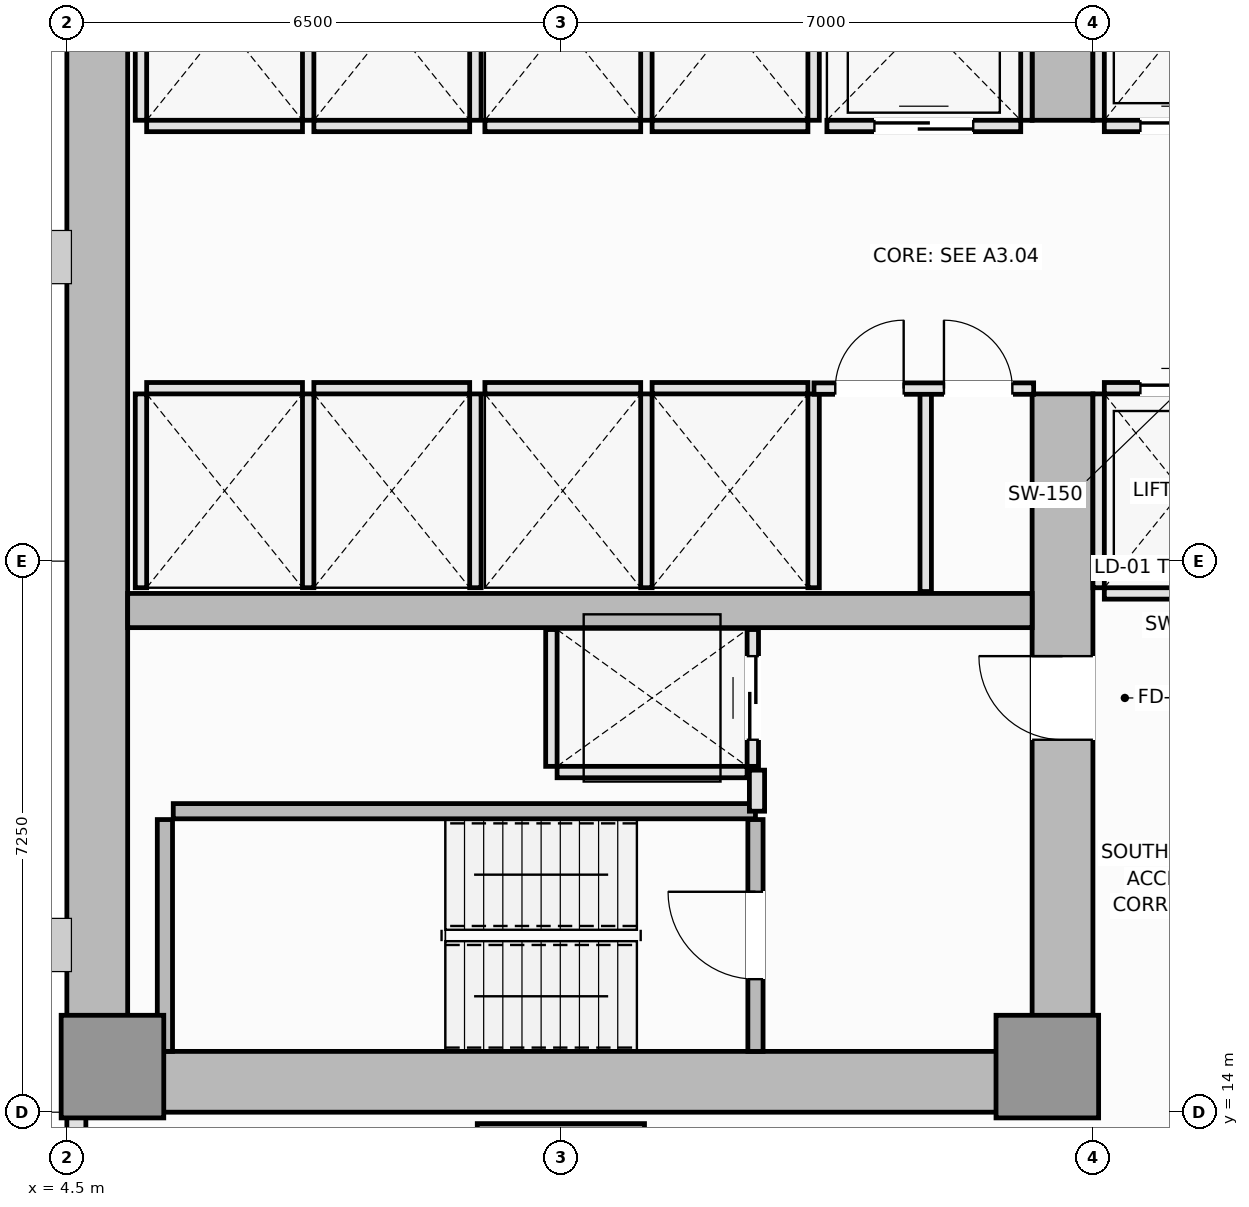
"""IFC4 building model, lengths in metres.
Left out: names, types, materials, properties, quantities, classifications, styles, units other than length and angle.
Written with IfcOpenShell. Run it as: python <this file> out.ifc"""

import sys

from ifc_helpers import new_model, si_unit, direction, frame, frame_2d, origin, origin_2d, place, context, subcontext, project, spatial, rectangle, extrude, element, fill, save


model = new_model("IFC4")
c1 = context("Model", 3, precision=1e-05, world=origin(), true_north=direction((0.0, 1.0)))
c2 = subcontext(c1, "Body", "Model", "MODEL_VIEW")
j1 = project(units=[si_unit("LENGTHUNIT", "METRE"), si_unit("PLANEANGLEUNIT", "RADIAN")], contexts=[c1])
p1 = place(None, origin())
s1 = spatial("IfcSite", under=j1, at=p1, CompositionType="ELEMENT")
p2 = place(p1, origin())
s2 = spatial("IfcBuilding", under=s1, at=p2, CompositionType="ELEMENT")
p3 = place(p2, frame((0.0, 0.0, 29.15)))
s3 = spatial("IfcBuildingStorey", under=s2, at=p3, CompositionType="ELEMENT", Elevation=29.15)
p4 = place(p3, frame((4.5, 14.4, 0.0), z_axis=(0.0, 0.0, 1.0), x_axis=(1.0, 0.0, 0.0)))
e1 = element("IfcWall", 1, at=p4, inside=s3, PredefinedType="SHEAR", context=c2, shape_type="SweptSolid", body=[
    extrude(rectangle(XDim=13.5, YDim=0.8, at=frame_2d((6.75, 0.0))), origin(), (0.0, 0.0, 1.0), 3.55),
])
p5 = place(p3, frame((4.9, 14.8, 0.0), z_axis=(0.0, 0.0, 1.0), x_axis=(0.0, 1.0, 0.0)))
e2 = element("IfcWall", 2, at=p5, inside=s3, PredefinedType="SHEAR", context=c2, shape_type="SweptSolid", body=[
    extrude(rectangle(XDim=20.9, YDim=0.8, at=frame_2d((10.45, 0.0))), origin(), (0.0, 0.0, 1.0), 3.55),
])
p6 = place(p3, frame((17.6, 14.8, 0.0), z_axis=(0.0, 0.0, 1.0), x_axis=(0.0, 1.0, 0.0)))
e3 = element("IfcWall", 3, at=p6, inside=s3, PredefinedType="SHEAR", context=c2, shape_type="SweptSolid", body=[
    extrude(rectangle(XDim=8.65, YDim=0.8, at=frame_2d((4.325, 0.0))), origin(), (0.0, 0.0, 1.0), 3.55),
])
p7 = place(p6, frame((4.1, 0.0, 0.0)))
e4 = element("IfcOpeningElement", 4, at=p7, cuts=e3, PredefinedType="OPENING", context=c2, shape_type="SweptSolid", body=[
    extrude(rectangle(XDim=1.1, YDim=2.15, at=frame_2d((0.55, 1.075))), frame((0.0, 0.41, 0.0), z_axis=(0.0, -1.0, 0.0), x_axis=(1.0, 0.0, 0.0)), (0.0, 0.0, 1.0), 0.82),
])
p8 = place(p3, frame((17.6, 27.05, 0.0), z_axis=(0.0, 0.0, 1.0), x_axis=(0.0, 1.0, 0.0)))
e5 = element("IfcWall", 5, at=p8, inside=s3, PredefinedType="SHEAR", context=c2, shape_type="SweptSolid", body=[
    extrude(rectangle(XDim=8.65, YDim=0.8, at=frame_2d((4.325, 0.0))), origin(), (0.0, 0.0, 1.0), 3.55),
])
p9 = place(p8, frame((3.45, 0.0, 0.0)))
e6 = element("IfcOpeningElement", 6, at=p9, cuts=e5, PredefinedType="OPENING", context=c2, shape_type="SweptSolid", body=[
    extrude(rectangle(XDim=1.1, YDim=2.15, at=frame_2d((0.55, 1.075))), frame((0.0, 0.41, 0.0), z_axis=(0.0, -1.0, 0.0), x_axis=(1.0, 0.0, 0.0)), (0.0, 0.0, 1.0), 0.82),
])
p10 = place(p3, frame((5.3, 20.6, 0.0), z_axis=(0.0, 0.0, 1.0), x_axis=(1.0, 0.0, 0.0)))
e7 = element("IfcWall", 7, at=p10, inside=s3, PredefinedType="SHEAR", context=c2, shape_type="SweptSolid", body=[
    extrude(rectangle(XDim=11.9, YDim=0.45, at=frame_2d((5.95, 0.0))), origin(), (0.0, 0.0, 1.0), 3.55),
])
for number, where, z_axis, x_axis in (
    (8, (5.1, 14.6, 0.0), (0.0, 0.0, 1.0), (1.0, 0.0, 0.0)),
    (9, (17.4, 14.6, 0.0), (0.0, 0.0, 1.0), (1.0, 0.0, 0.0)),
):
    element("IfcColumn", number, at=place(p3, frame(where, z_axis=z_axis, x_axis=x_axis)), inside=s3, PredefinedType="PILASTER", context=c2, shape_type="SweptSolid", body=[
        extrude(rectangle(XDim=1.35, YDim=1.35, at=origin_2d()), origin(), (0.0, 0.0, 1.0), 3.55),
    ])
p11 = place(p3, frame((11.0, 12.75, 0.0), z_axis=(0.0, 0.0, 1.0), x_axis=(1.0, 0.0, 0.0)))
e10 = element("IfcColumn", 10, at=p11, inside=s3, PredefinedType="COLUMN", context=c2, shape_type="SweptSolid", body=[
    extrude(rectangle(XDim=2.2, YDim=2.2, at=origin_2d()), origin(), (0.0, 0.0, 1.0), 3.55),
])
p12 = place(p3, frame((4.625, 14.0, 0.0), z_axis=(0.0, 0.0, 1.0), x_axis=(0.0, -1.0, 0.0)))
e11 = element("IfcWall", 11, at=p12, inside=s3, PredefinedType="SOLIDWALL", context=c2, shape_type="SweptSolid", body=[
    extrude(rectangle(XDim=8.0, YDim=0.25, at=frame_2d((4.0, 0.0))), origin(), (0.0, 0.0, 1.0), 3.37),
])
p13 = place(p12, frame((2.9, 0.0, 0.9)))
e12 = element("IfcOpeningElement", 12, at=p13, cuts=e11, PredefinedType="OPENING", context=c2, shape_type="SweptSolid", body=[
    extrude(rectangle(XDim=2.2, YDim=1.8, at=frame_2d((1.1, 0.9))), frame((0.0, 0.135, 0.0), z_axis=(0.0, -1.0, 0.0), x_axis=(1.0, 0.0, 0.0)), (0.0, 0.0, 1.0), 0.27),
])
p14 = place(p3, frame((5.79, 14.8, 0.0), z_axis=(0.0, 0.0, 1.0), x_axis=(0.0, 1.0, 0.0)))
e13 = element("IfcWall", 13, at=p14, inside=s3, PredefinedType="SOLIDWALL", context=c2, shape_type="SweptSolid", body=[
    extrude(rectangle(XDim=3.05, YDim=0.2, at=frame_2d((1.525, 0.0))), origin(), (0.0, 0.0, 1.0), 3.55),
])
p15 = place(p3, frame((5.9, 17.96, 0.0), z_axis=(0.0, 0.0, 1.0), x_axis=(1.0, 0.0, 0.0)))
e14 = element("IfcWall", 14, at=p15, inside=s3, PredefinedType="SOLIDWALL", context=c2, shape_type="SweptSolid", body=[
    extrude(rectangle(XDim=7.66, YDim=0.2, at=frame_2d((3.83, 0.0))), origin(), (0.0, 0.0, 1.0), 3.55),
])
p16 = place(p3, frame((13.56, 14.8, 0.0), z_axis=(0.0, 0.0, 1.0), x_axis=(0.0, 1.0, 0.0)))
e15 = element("IfcWall", 15, at=p16, inside=s3, PredefinedType="SOLIDWALL", context=c2, shape_type="SweptSolid", body=[
    extrude(rectangle(XDim=3.05, YDim=0.2, at=frame_2d((1.525, 0.0))), origin(), (0.0, 0.0, 1.0), 3.55),
])
p17 = place(p16, frame((0.95, 0.0, 0.0)))
e16 = element("IfcOpeningElement", 16, at=p17, cuts=e15, PredefinedType="OPENING", context=c2, shape_type="SweptSolid", body=[
    extrude(rectangle(XDim=1.15, YDim=2.15, at=frame_2d((0.575, 1.075))), frame((0.0, 0.11, 0.0), z_axis=(0.0, -1.0, 0.0), x_axis=(1.0, 0.0, 0.0)), (0.0, 0.0, 1.0), 0.22),
])
p18 = place(p3, frame((18.15, 20.825, 0.0), z_axis=(0.0, 0.0, 1.0), x_axis=(1.0, 0.0, 0.0)))
e17 = element("IfcWall", 17, at=p18, inside=s3, PredefinedType="PARTITIONING", context=c2, shape_type="SweptSolid", body=[
    extrude(rectangle(XDim=2.05, YDim=0.15, at=frame_2d((1.025, 0.0))), origin(), (0.0, 0.0, 1.0), 3.37),
])
p19 = place(p3, frame((18.15, 23.525, 0.0), z_axis=(0.0, 0.0, 1.0), x_axis=(1.0, 0.0, 0.0)))
e18 = element("IfcWall", 18, at=p19, inside=s3, PredefinedType="PARTITIONING", context=c2, shape_type="SweptSolid", body=[
    extrude(rectangle(XDim=2.05, YDim=0.15, at=frame_2d((1.025, 0.0))), origin(), (0.0, 0.0, 1.0), 3.37),
])
p20 = place(p19, frame((0.475, 0.0, 0.0)))
e19 = element("IfcOpeningElement", 19, at=p20, cuts=e18, PredefinedType="OPENING", context=c2, shape_type="SweptSolid", body=[
    extrude(rectangle(XDim=1.1, YDim=2.2, at=frame_2d((0.55, 1.1))), frame((0.0, 0.085, 0.0), z_axis=(0.0, -1.0, 0.0), x_axis=(1.0, 0.0, 0.0)), (0.0, 0.0, 1.0), 0.17),
])
p21 = place(p3, frame((18.075, 20.9, 0.0), z_axis=(0.0, 0.0, 1.0), x_axis=(0.0, 1.0, 0.0)))
e20 = element("IfcWall", 20, at=p21, inside=s3, PredefinedType="PARTITIONING", context=c2, shape_type="SweptSolid", body=[
    extrude(rectangle(XDim=2.55, YDim=0.15, at=frame_2d((1.275, 0.0))), origin(), (0.0, 0.0, 1.0), 3.37),
])
p22 = place(p3, frame((18.15, 26.975, 0.0), z_axis=(0.0, 0.0, 1.0), x_axis=(1.0, 0.0, 0.0)))
e21 = element("IfcWall", 21, at=p22, inside=s3, PredefinedType="PARTITIONING", context=c2, shape_type="SweptSolid", body=[
    extrude(rectangle(XDim=2.05, YDim=0.15, at=frame_2d((1.025, 0.0))), origin(), (0.0, 0.0, 1.0), 3.37),
])
p23 = place(p22, frame((0.475, 0.0, 0.0)))
e22 = element("IfcOpeningElement", 22, at=p23, cuts=e21, PredefinedType="OPENING", context=c2, shape_type="SweptSolid", body=[
    extrude(rectangle(XDim=1.1, YDim=2.2, at=frame_2d((0.55, 1.1))), frame((0.0, 0.085, 0.0), z_axis=(0.0, -1.0, 0.0), x_axis=(1.0, 0.0, 0.0)), (0.0, 0.0, 1.0), 0.17),
])
p24 = place(p3, frame((18.075, 27.05, 0.0), z_axis=(0.0, 0.0, 1.0), x_axis=(0.0, 1.0, 0.0)))
e23 = element("IfcWall", 23, at=p24, inside=s3, PredefinedType="PARTITIONING", context=c2, shape_type="SweptSolid", body=[
    extrude(rectangle(XDim=2.55, YDim=0.15, at=frame_2d((1.275, 0.0))), origin(), (0.0, 0.0, 1.0), 3.37),
])
p25 = place(p3, frame((5.55, 23.525, 0.0), z_axis=(0.0, 0.0, 1.0), x_axis=(1.0, 0.0, 0.0)))
e24 = element("IfcWall", 24, at=p25, inside=s3, PredefinedType="PARTITIONING", context=c2, shape_type="SweptSolid", body=[
    extrude(rectangle(XDim=2.05, YDim=0.15, at=frame_2d((1.025, 0.0))), origin(), (0.0, 0.0, 1.0), 3.37),
])
for number, where, z_axis, x_axis in (
    (25, (5.475, 20.9, 0.0), (0.0, 0.0, 1.0), (0.0, 1.0, 0.0)),
    (26, (7.675, 20.9, 0.0), (0.0, 0.0, 1.0), (0.0, 1.0, 0.0)),
):
    element("IfcWall", number, at=place(p3, frame(where, z_axis=z_axis, x_axis=x_axis)), inside=s3, PredefinedType="PARTITIONING", context=c2, shape_type="SweptSolid", body=[
        extrude(rectangle(XDim=2.55, YDim=0.15, at=frame_2d((1.275, 0.0))), origin(), (0.0, 0.0, 1.0), 3.37),
    ])
p26 = place(p3, frame((7.75, 23.525, 0.0), z_axis=(0.0, 0.0, 1.0), x_axis=(1.0, 0.0, 0.0)))
e27 = element("IfcWall", 27, at=p26, inside=s3, PredefinedType="PARTITIONING", context=c2, shape_type="SweptSolid", body=[
    extrude(rectangle(XDim=2.05, YDim=0.15, at=frame_2d((1.025, 0.0))), origin(), (0.0, 0.0, 1.0), 3.37),
])
p27 = place(p3, frame((9.875, 20.9, 0.0), z_axis=(0.0, 0.0, 1.0), x_axis=(0.0, 1.0, 0.0)))
e28 = element("IfcWall", 28, at=p27, inside=s3, PredefinedType="PARTITIONING", context=c2, shape_type="SweptSolid", body=[
    extrude(rectangle(XDim=2.55, YDim=0.15, at=frame_2d((1.275, 0.0))), origin(), (0.0, 0.0, 1.0), 3.37),
])
p28 = place(p3, frame((5.55, 26.975, 0.0), z_axis=(0.0, 0.0, 1.0), x_axis=(1.0, 0.0, 0.0)))
e29 = element("IfcWall", 29, at=p28, inside=s3, PredefinedType="PARTITIONING", context=c2, shape_type="SweptSolid", body=[
    extrude(rectangle(XDim=2.05, YDim=0.15, at=frame_2d((1.025, 0.0))), origin(), (0.0, 0.0, 1.0), 3.37),
])
for number, where, z_axis, x_axis in (
    (30, (5.475, 27.05, 0.0), (0.0, 0.0, 1.0), (0.0, 1.0, 0.0)),
    (31, (7.675, 27.05, 0.0), (0.0, 0.0, 1.0), (0.0, 1.0, 0.0)),
):
    element("IfcWall", number, at=place(p3, frame(where, z_axis=z_axis, x_axis=x_axis)), inside=s3, PredefinedType="PARTITIONING", context=c2, shape_type="SweptSolid", body=[
        extrude(rectangle(XDim=2.55, YDim=0.15, at=frame_2d((1.275, 0.0))), origin(), (0.0, 0.0, 1.0), 3.37),
    ])
p29 = place(p3, frame((7.75, 26.975, 0.0), z_axis=(0.0, 0.0, 1.0), x_axis=(1.0, 0.0, 0.0)))
e32 = element("IfcWall", 32, at=p29, inside=s3, PredefinedType="PARTITIONING", context=c2, shape_type="SweptSolid", body=[
    extrude(rectangle(XDim=2.05, YDim=0.15, at=frame_2d((1.025, 0.0))), origin(), (0.0, 0.0, 1.0), 3.37),
])
p30 = place(p3, frame((9.875, 27.05, 0.0), z_axis=(0.0, 0.0, 1.0), x_axis=(0.0, 1.0, 0.0)))
e33 = element("IfcWall", 33, at=p30, inside=s3, PredefinedType="PARTITIONING", context=c2, shape_type="SweptSolid", body=[
    extrude(rectangle(XDim=2.55, YDim=0.15, at=frame_2d((1.275, 0.0))), origin(), (0.0, 0.0, 1.0), 3.37),
])
p31 = place(p3, frame((10.0, 23.525, 0.0), z_axis=(0.0, 0.0, 1.0), x_axis=(1.0, 0.0, 0.0)))
e34 = element("IfcWall", 34, at=p31, inside=s3, PredefinedType="PARTITIONING", context=c2, shape_type="SweptSolid", body=[
    extrude(rectangle(XDim=2.05, YDim=0.15, at=frame_2d((1.025, 0.0))), origin(), (0.0, 0.0, 1.0), 3.37),
])
p32 = place(p3, frame((12.125, 20.9, 0.0), z_axis=(0.0, 0.0, 1.0), x_axis=(0.0, 1.0, 0.0)))
e35 = element("IfcWall", 35, at=p32, inside=s3, PredefinedType="PARTITIONING", context=c2, shape_type="SweptSolid", body=[
    extrude(rectangle(XDim=2.55, YDim=0.15, at=frame_2d((1.275, 0.0))), origin(), (0.0, 0.0, 1.0), 3.37),
])
p33 = place(p3, frame((12.2, 23.525, 0.0), z_axis=(0.0, 0.0, 1.0), x_axis=(1.0, 0.0, 0.0)))
e36 = element("IfcWall", 36, at=p33, inside=s3, PredefinedType="PARTITIONING", context=c2, shape_type="SweptSolid", body=[
    extrude(rectangle(XDim=2.05, YDim=0.15, at=frame_2d((1.025, 0.0))), origin(), (0.0, 0.0, 1.0), 3.37),
])
p34 = place(p3, frame((14.325, 20.9, 0.0), z_axis=(0.0, 0.0, 1.0), x_axis=(0.0, 1.0, 0.0)))
e37 = element("IfcWall", 37, at=p34, inside=s3, PredefinedType="PARTITIONING", context=c2, shape_type="SweptSolid", body=[
    extrude(rectangle(XDim=2.55, YDim=0.15, at=frame_2d((1.275, 0.0))), origin(), (0.0, 0.0, 1.0), 3.37),
])
p35 = place(p3, frame((10.0, 26.975, 0.0), z_axis=(0.0, 0.0, 1.0), x_axis=(1.0, 0.0, 0.0)))
e38 = element("IfcWall", 38, at=p35, inside=s3, PredefinedType="PARTITIONING", context=c2, shape_type="SweptSolid", body=[
    extrude(rectangle(XDim=2.05, YDim=0.15, at=frame_2d((1.025, 0.0))), origin(), (0.0, 0.0, 1.0), 3.37),
])
p36 = place(p3, frame((12.125, 27.05, 0.0), z_axis=(0.0, 0.0, 1.0), x_axis=(0.0, 1.0, 0.0)))
e39 = element("IfcWall", 39, at=p36, inside=s3, PredefinedType="PARTITIONING", context=c2, shape_type="SweptSolid", body=[
    extrude(rectangle(XDim=2.55, YDim=0.15, at=frame_2d((1.275, 0.0))), origin(), (0.0, 0.0, 1.0), 3.37),
])
p37 = place(p3, frame((12.2, 26.975, 0.0), z_axis=(0.0, 0.0, 1.0), x_axis=(1.0, 0.0, 0.0)))
e40 = element("IfcWall", 40, at=p37, inside=s3, PredefinedType="PARTITIONING", context=c2, shape_type="SweptSolid", body=[
    extrude(rectangle(XDim=2.05, YDim=0.15, at=frame_2d((1.025, 0.0))), origin(), (0.0, 0.0, 1.0), 3.37),
])
p38 = place(p3, frame((14.325, 27.05, 0.0), z_axis=(0.0, 0.0, 1.0), x_axis=(0.0, 1.0, 0.0)))
e41 = element("IfcWall", 41, at=p38, inside=s3, PredefinedType="PARTITIONING", context=c2, shape_type="SweptSolid", body=[
    extrude(rectangle(XDim=2.55, YDim=0.15, at=frame_2d((1.275, 0.0))), origin(), (0.0, 0.0, 1.0), 3.37),
])
p39 = place(p3, frame((14.5, 26.975, 0.0), z_axis=(0.0, 0.0, 1.0), x_axis=(1.0, 0.0, 0.0)))
e42 = element("IfcWall", 42, at=p39, inside=s3, PredefinedType="PARTITIONING", context=c2, shape_type="SweptSolid", body=[
    extrude(rectangle(XDim=2.55, YDim=0.15, at=frame_2d((1.275, 0.0))), origin(), (0.0, 0.0, 1.0), 3.37),
])
p40 = place(p39, frame((0.625, 0.0, 0.0)))
e43 = element("IfcOpeningElement", 43, at=p40, cuts=e42, PredefinedType="OPENING", context=c2, shape_type="SweptSolid", body=[
    extrude(rectangle(XDim=1.3, YDim=2.2, at=frame_2d((0.65, 1.1))), frame((0.0, 0.085, 0.0), z_axis=(0.0, -1.0, 0.0), x_axis=(1.0, 0.0, 0.0)), (0.0, 0.0, 1.0), 0.17),
])
p41 = place(p3, frame((17.125, 27.05, 0.0), z_axis=(0.0, 0.0, 1.0), x_axis=(0.0, 1.0, 0.0)))
e44 = element("IfcWall", 44, at=p41, inside=s3, PredefinedType="PARTITIONING", context=c2, shape_type="SweptSolid", body=[
    extrude(rectangle(XDim=2.6, YDim=0.15, at=frame_2d((1.3, 0.0))), origin(), (0.0, 0.0, 1.0), 3.37),
])
p42 = place(p3, frame((10.95, 18.475, 0.0), z_axis=(0.0, 0.0, 1.0), x_axis=(1.0, 0.0, 0.0)))
e45 = element("IfcWall", 45, at=p42, inside=s3, PredefinedType="PARTITIONING", context=c2, shape_type="SweptSolid", body=[
    extrude(rectangle(XDim=2.5, YDim=0.15, at=frame_2d((1.25, 0.0))), origin(), (0.0, 0.0, 1.0), 3.37),
])
p43 = place(p3, frame((10.875, 18.55, 0.0), z_axis=(0.0, 0.0, 1.0), x_axis=(0.0, 1.0, 0.0)))
e46 = element("IfcWall", 46, at=p43, inside=s3, PredefinedType="PARTITIONING", context=c2, shape_type="SweptSolid", body=[
    extrude(rectangle(XDim=1.8, YDim=0.15, at=frame_2d((0.9, 0.0))), origin(), (0.0, 0.0, 1.0), 3.37),
])
p44 = place(p3, frame((13.525, 18.55, 0.0), z_axis=(0.0, 0.0, 1.0), x_axis=(0.0, 1.0, 0.0)))
e47 = element("IfcWall", 47, at=p44, inside=s3, PredefinedType="PARTITIONING", context=c2, shape_type="SweptSolid", body=[
    extrude(rectangle(XDim=1.8, YDim=0.15, at=frame_2d((0.9, 0.0))), origin(), (0.0, 0.0, 1.0), 3.37),
])
p45 = place(p44, frame((0.35, 0.0, 0.0)))
e48 = element("IfcOpeningElement", 48, at=p45, cuts=e47, PredefinedType="OPENING", context=c2, shape_type="SweptSolid", body=[
    extrude(rectangle(XDim=1.1, YDim=2.2, at=frame_2d((0.55, 1.1))), frame((0.0, 0.085, 0.0), z_axis=(0.0, -1.0, 0.0), x_axis=(1.0, 0.0, 0.0)), (0.0, 0.0, 1.0), 0.17),
])
p46 = place(p3, frame((13.58, 17.96, 0.0), z_axis=(0.0, 0.0, 1.0), x_axis=(0.0, 1.0, 0.0)))
e49 = element("IfcWall", 49, at=p46, inside=s3, PredefinedType="PARTITIONING", context=c2, shape_type="SweptSolid", body=[
    extrude(rectangle(XDim=0.54, YDim=0.2, at=frame_2d((0.27, 0.0))), origin(), (0.0, 0.0, 1.0), 3.37),
])
p47 = place(p3, frame((15.8, 20.85, 0.0), z_axis=(0.0, 0.0, 1.0), x_axis=(0.0, 1.0, 0.0)))
e50 = element("IfcWall", 50, at=p47, inside=s3, PredefinedType="PARTITIONING", context=c2, shape_type="SweptSolid", body=[
    extrude(rectangle(XDim=2.67, YDim=0.15, at=frame_2d((1.335, 0.0))), origin(), (0.0, 0.0, 1.0), 3.37),
])
p48 = place(p3, frame((14.33, 23.52, 0.0), z_axis=(0.0, 0.0, 1.0), x_axis=(1.0, 0.0, 0.0)))
e51 = element("IfcWall", 51, at=p48, inside=s3, PredefinedType="PARTITIONING", context=c2, shape_type="SweptSolid", body=[
    extrude(rectangle(XDim=2.89, YDim=0.15, at=frame_2d((1.445, 0.0))), origin(), (0.0, 0.0, 1.0), 3.37),
])
p49 = place(p48, frame((0.28, 0.0, 0.0)))
e52 = element("IfcOpeningElement", 52, at=p49, cuts=e51, PredefinedType="OPENING", context=c2, shape_type="SweptSolid", body=[
    extrude(rectangle(XDim=0.9, YDim=2.1, at=frame_2d((0.45, 1.05))), frame((0.0, 0.085, 0.0), z_axis=(0.0, -1.0, 0.0), x_axis=(1.0, 0.0, 0.0)), (0.0, 0.0, 1.0), 0.17),
])
p50 = place(p48, frame((1.71, 0.0, 0.0)))
e53 = element("IfcOpeningElement", 53, at=p50, cuts=e51, PredefinedType="OPENING", context=c2, shape_type="SweptSolid", body=[
    extrude(rectangle(XDim=0.9, YDim=2.1, at=frame_2d((0.45, 1.05))), frame((0.0, 0.085, 0.0), z_axis=(0.0, -1.0, 0.0), x_axis=(1.0, 0.0, 0.0)), (0.0, 0.0, 1.0), 0.17),
])
p51 = place(p17, origin())
e54 = element("IfcDoor", 54, at=p51, inside=s3, OperationType="SINGLE_SWING_RIGHT", PredefinedType="DOOR", context=c2, shape_type="SweptSolid", body=[
    extrude(rectangle(XDim=1.15, YDim=2.15, at=frame_2d((0.575, 1.075))), frame((0.0, 0.025, 0.0), z_axis=(0.0, -1.0, 0.0), x_axis=(1.0, 0.0, 0.0)), (0.0, 0.0, 1.0), 0.05),
])
fill(e16, e54)
p52 = place(p20, origin())
e55 = element("IfcDoor", 55, at=p52, inside=s3, OperationType="DOUBLE_DOOR_SLIDING", PredefinedType="DOOR", context=c2, shape_type="SweptSolid", body=[
    extrude(rectangle(XDim=1.1, YDim=2.2, at=frame_2d((0.55, 1.1))), frame((0.0, 0.025, 0.0), z_axis=(0.0, -1.0, 0.0), x_axis=(1.0, 0.0, 0.0)), (0.0, 0.0, 1.0), 0.05),
])
fill(e19, e55)
p53 = place(p23, origin())
e56 = element("IfcDoor", 56, at=p53, inside=s3, OperationType="DOUBLE_DOOR_SLIDING", PredefinedType="DOOR", context=c2, shape_type="SweptSolid", body=[
    extrude(rectangle(XDim=1.1, YDim=2.2, at=frame_2d((0.55, 1.1))), frame((0.0, 0.025, 0.0), z_axis=(0.0, -1.0, 0.0), x_axis=(1.0, 0.0, 0.0)), (0.0, 0.0, 1.0), 0.05),
])
fill(e22, e56)
p54 = place(p40, origin())
e57 = element("IfcDoor", 57, at=p54, inside=s3, OperationType="DOUBLE_DOOR_SLIDING", PredefinedType="DOOR", context=c2, shape_type="SweptSolid", body=[
    extrude(rectangle(XDim=1.3, YDim=2.2, at=frame_2d((0.65, 1.1))), frame((0.0, 0.025, 0.0), z_axis=(0.0, -1.0, 0.0), x_axis=(1.0, 0.0, 0.0)), (0.0, 0.0, 1.0), 0.05),
])
fill(e43, e57)
p55 = place(p45, origin())
e58 = element("IfcDoor", 58, at=p55, inside=s3, OperationType="DOUBLE_DOOR_SLIDING", PredefinedType="DOOR", context=c2, shape_type="SweptSolid", body=[
    extrude(rectangle(XDim=1.1, YDim=2.2, at=frame_2d((0.55, 1.1))), frame((0.0, 0.025, 0.0), z_axis=(0.0, -1.0, 0.0), x_axis=(1.0, 0.0, 0.0)), (0.0, 0.0, 1.0), 0.05),
])
fill(e48, e58)
p56 = place(p7, origin())
e59 = element("IfcDoor", 59, at=p56, inside=s3, OperationType="SINGLE_SWING_RIGHT", PredefinedType="DOOR", context=c2, shape_type="SweptSolid", body=[
    extrude(rectangle(XDim=1.1, YDim=2.15, at=frame_2d((0.55, 1.075))), frame((0.0, 0.025, 0.0), z_axis=(0.0, -1.0, 0.0), x_axis=(1.0, 0.0, 0.0)), (0.0, 0.0, 1.0), 0.05),
])
fill(e4, e59)
p57 = place(p49, origin())
e60 = element("IfcDoor", 60, at=p57, inside=s3, OperationType="SINGLE_SWING_RIGHT", PredefinedType="DOOR", context=c2, shape_type="SweptSolid", body=[
    extrude(rectangle(XDim=0.9, YDim=2.1, at=frame_2d((0.45, 1.05))), frame((0.0, 0.025, 0.0), z_axis=(0.0, -1.0, 0.0), x_axis=(1.0, 0.0, 0.0)), (0.0, 0.0, 1.0), 0.05),
])
fill(e52, e60)
p58 = place(p50, origin())
e61 = element("IfcDoor", 61, at=p58, inside=s3, OperationType="SINGLE_SWING_LEFT", PredefinedType="DOOR", context=c2, shape_type="SweptSolid", body=[
    extrude(rectangle(XDim=0.9, YDim=2.1, at=frame_2d((0.45, 1.05))), frame((0.0, 0.025, 0.0), z_axis=(0.0, -1.0, 0.0), x_axis=(1.0, 0.0, 0.0)), (0.0, 0.0, 1.0), 0.05),
])
fill(e53, e61)
save(model, sys.argv[1])
